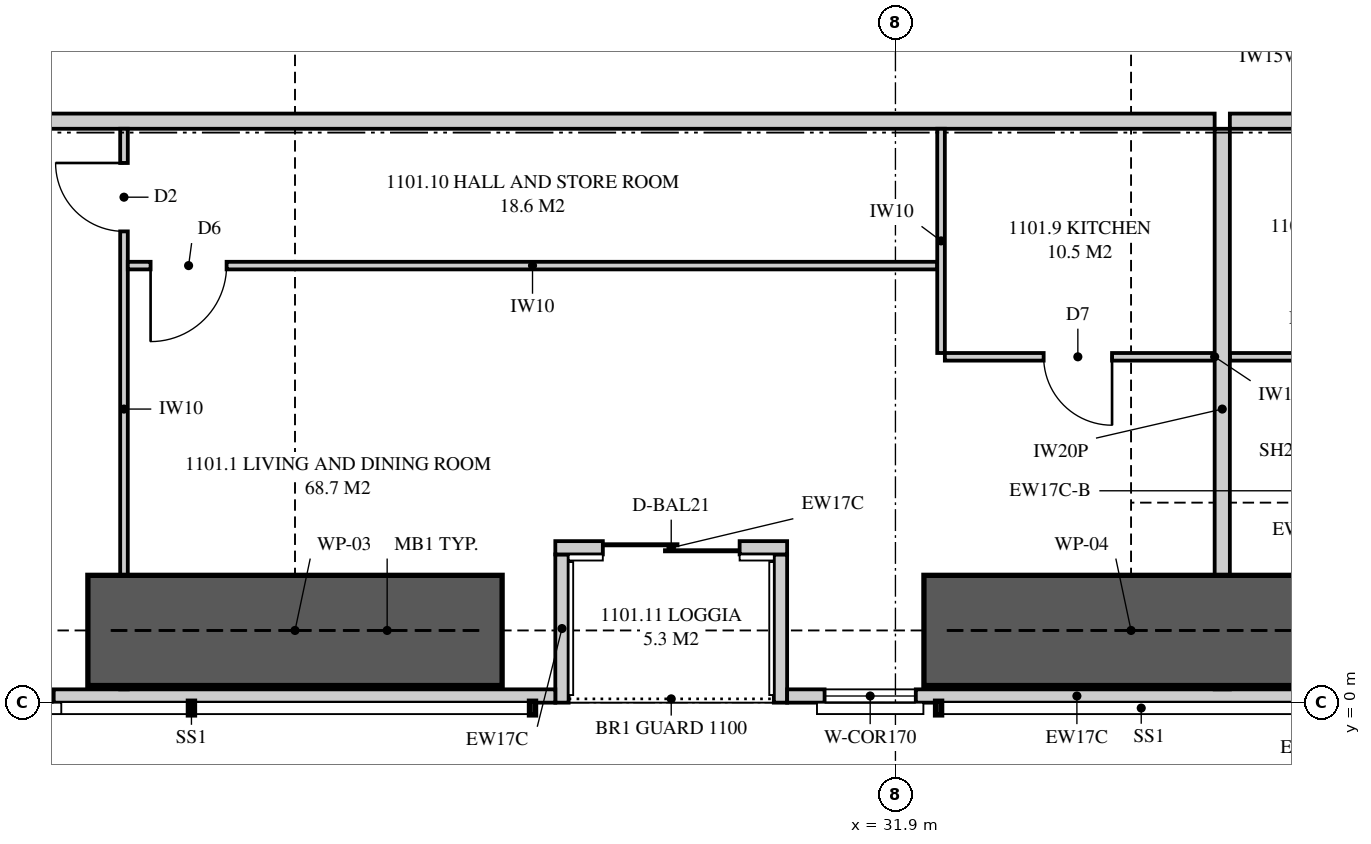
"""IFC4 building model, lengths in metres.
Left out: names, types, materials, properties, quantities, classifications, styles, units other than length and angle.
Written with IfcOpenShell. Run it as: python <this file> out.ifc"""

import sys

from ifc_helpers import new_model, si_unit, direction, frame, frame_2d, origin, place, context, subcontext, project, spatial, polyline, rectangle, outline, extrude, element, fill, save


model = new_model("IFC4")
c1 = context("Model", 3, precision=1e-05, world=origin(), true_north=direction((0.0, 1.0)))
c2 = subcontext(c1, "Body", "Model", "MODEL_VIEW")
j1 = project(units=[si_unit("LENGTHUNIT", "METRE"), si_unit("PLANEANGLEUNIT", "RADIAN")], contexts=[c1])
p1 = place(None, origin())
s1 = spatial("IfcSite", under=j1, at=p1, CompositionType="ELEMENT")
p2 = place(p1, origin())
s2 = spatial("IfcBuilding", under=s1, at=p2, CompositionType="ELEMENT")
p3 = place(p2, frame((0.0, 0.0, 44.45)))
s3 = spatial("IfcBuildingStorey", under=s2, at=p3, CompositionType="ELEMENT", Elevation=44.45)
p4 = place(p3, frame((5.051, 0.087, 0.0), z_axis=(0.0, 0.0, 1.0), x_axis=(1.0, 0.0, 0.0)))
e1 = element("IfcWall", 1, at=p4, inside=s3, PredefinedType="SOLIDWALL", context=c2, shape_type="SweptSolid", body=[
    extrude(outline(polyline([(0.0, 0.0), (22.374, 0.0), (22.374, 2.15), (7.949, 2.15), (7.949, 3.11), (7.793, 3.11), (7.793, 2.15), (7.745, 2.15), (7.745, 3.11), (0.0, 3.11), (0.0, 0.0)])), frame((0.0, 0.087, 0.0), z_axis=(0.0, -1.0, 0.0), x_axis=(1.0, 0.0, 0.0)), (0.0, 0.0, 1.0), 0.175),
])
p5 = place(p4, frame((3.319, 0.0, 0.4)))
e2 = element("IfcOpeningElement", 2, at=p5, cuts=e1, PredefinedType="OPENING", context=c2, shape_type="SweptSolid", body=[
    extrude(rectangle(XDim=1.8, YDim=1.7, at=frame_2d((0.9, 0.85))), frame((0.0, 0.097, 0.0), z_axis=(0.0, -1.0, 0.0), x_axis=(1.0, 0.0, 0.0)), (0.0, 0.0, 1.0), 0.195),
])
p6 = place(p4, frame((10.806, 0.0, 0.4)))
e3 = element("IfcOpeningElement", 3, at=p6, cuts=e1, PredefinedType="OPENING", context=c2, shape_type="SweptSolid", body=[
    extrude(rectangle(XDim=1.8, YDim=1.7, at=frame_2d((0.9, 0.85))), frame((0.0, 0.097, 0.0), z_axis=(0.0, -1.0, 0.0), x_axis=(1.0, 0.0, 0.0)), (0.0, 0.0, 1.0), 0.195),
])
p7 = place(p4, frame((13.974, 0.0, 0.4)))
e4 = element("IfcOpeningElement", 4, at=p7, cuts=e1, PredefinedType="OPENING", context=c2, shape_type="SweptSolid", body=[
    extrude(rectangle(XDim=1.8, YDim=1.7, at=frame_2d((0.9, 0.85))), frame((0.0, 0.097, 0.0), z_axis=(0.0, -1.0, 0.0), x_axis=(1.0, 0.0, 0.0)), (0.0, 0.0, 1.0), 0.195),
])
p8 = place(p3, frame((30.475, 0.087, 0.0), z_axis=(0.0, 0.0, 1.0), x_axis=(1.0, 0.0, 0.0)))
e5 = element("IfcWall", 5, at=p8, inside=s3, PredefinedType="SOLIDWALL", context=c2, shape_type="SweptSolid", body=[
    extrude(outline(polyline([(0.0, 0.0), (7.625, 0.0), (7.625, 3.11), (4.729, 3.11), (4.729, 2.15), (4.681, 2.15), (4.681, 3.11), (4.525, 3.11), (4.525, 2.15), (0.0, 2.15), (0.0, 0.0)])), frame((0.0, 0.087, 0.0), z_axis=(0.0, -1.0, 0.0), x_axis=(1.0, 0.0, 0.0)), (0.0, 0.0, 1.0), 0.175),
])
p9 = place(p8, frame((0.493, 0.0, 0.4)))
e6 = element("IfcOpeningElement", 6, at=p9, cuts=e5, PredefinedType="OPENING", context=c2, shape_type="SweptSolid", body=[
    extrude(rectangle(XDim=1.2, YDim=1.7, at=frame_2d((0.6, 0.85))), frame((0.0, 0.097, 0.0), z_axis=(0.0, -1.0, 0.0), x_axis=(1.0, 0.0, 0.0)), (0.0, 0.0, 1.0), 0.195),
])
p10 = place(p3, frame((27.425, 2.038, 0.0), z_axis=(0.0, 0.0, 1.0), x_axis=(1.0, 0.0, 0.0)))
e7 = element("IfcWall", 7, at=p10, inside=s3, PredefinedType="SOLIDWALL", context=c2, shape_type="SweptSolid", body=[
    extrude(rectangle(XDim=3.05, YDim=0.175, at=frame_2d((1.525, 0.0))), origin(), (0.0, 0.0, 1.0), 3.11),
])
p11 = place(p10, frame((0.625, 0.0, 0.0)))
e8 = element("IfcOpeningElement", 8, at=p11, cuts=e7, PredefinedType="OPENING", context=c2, shape_type="SweptSolid", body=[
    extrude(rectangle(XDim=1.8, YDim=2.1, at=frame_2d((0.9, 1.05))), frame((0.0, 0.097, 0.0), z_axis=(0.0, -1.0, 0.0), x_axis=(1.0, 0.0, 0.0)), (0.0, 0.0, 1.0), 0.195),
])
for number, where, z_axis, x_axis in (
    (9, (27.512, 0.0, 0.0), (0.0, 0.0, 1.0), (0.0, 1.0, 0.0)),
    (10, (30.387, 0.0, 0.0), (0.0, 0.0, 1.0), (0.0, 1.0, 0.0)),
):
    element("IfcWall", number, at=place(p3, frame(where, z_axis=z_axis, x_axis=x_axis)), inside=s3, PredefinedType="SOLIDWALL", context=c2, shape_type="SweptSolid", body=[
        extrude(outline(polyline([(0.0, 0.0), (1.95, 0.0), (1.95, 3.11), (1.75, 3.11), (1.75, 2.15), (0.15, 2.15), (0.15, 3.11), (0.0, 3.11), (0.0, 0.0)])), frame((0.0, 0.087, 0.0), z_axis=(0.0, -1.0, 0.0), x_axis=(1.0, 0.0, 0.0)), (0.0, 0.0, 1.0), 0.175),
    ])
p12 = place(p3, frame((36.2, 0.175, 0.0), z_axis=(0.0, 0.0, 1.0), x_axis=(0.0, 1.0, 0.0)))
e11 = element("IfcWall", 11, at=p12, inside=s3, PredefinedType="PARTITIONING", context=c2, shape_type="SweptSolid", body=[
    extrude(outline(polyline([(0.088, 3.11), (0.0, 3.11), (0.0, 0.0), (0.529, 0.0), (0.529, 0.677), (1.021, 0.677), (1.021, 0.0), (7.375, 0.0), (7.375, 3.11), (3.766, 3.11), (3.766, 2.51), (1.944, 2.51), (1.944, 2.15), (1.021, 2.15), (1.021, 1.473), (0.529, 1.473), (0.529, 2.15), (0.088, 2.15), (0.088, 3.11)])), frame((0.0, 0.1, 0.0), z_axis=(0.0, -1.0, 0.0), x_axis=(1.0, 0.0, 0.0)), (0.0, 0.0, 1.0), 0.2),
])
p13 = place(p3, frame((17.725, 7.65, 0.0), z_axis=(0.0, 0.0, 1.0), x_axis=(1.0, 0.0, 0.0)))
e12 = element("IfcWall", 12, at=p13, inside=s3, PredefinedType="PARTITIONING", context=c2, shape_type="SweptSolid", body=[
    extrude(outline(polyline([(0.0, 0.0), (18.375, 0.0), (18.375, 3.11), (17.612, 3.11), (17.612, 2.541), (16.938, 2.541), (16.938, 3.11), (6.612, 3.11), (6.612, 2.541), (5.938, 2.541), (5.938, 3.11), (0.0, 3.11), (0.0, 0.0)])), frame((0.0, 0.1, 0.0), z_axis=(0.0, -1.0, 0.0), x_axis=(1.0, 0.0, 0.0)), (0.0, 0.0, 1.0), 0.2),
])
p14 = place(p13, frame((0.875, 0.0, 0.0)))
e13 = element("IfcOpeningElement", 13, at=p14, cuts=e12, PredefinedType="OPENING", context=c2, shape_type="SweptSolid", body=[
    extrude(rectangle(XDim=1.05, YDim=2.2, at=frame_2d((0.525, 1.1))), frame((0.0, 0.11, 0.0), z_axis=(0.0, -1.0, 0.0), x_axis=(1.0, 0.0, 0.0)), (0.0, 0.0, 1.0), 0.22),
])
p15 = place(p3, frame((21.75, 0.175, 0.0), z_axis=(0.0, 0.0, 1.0), x_axis=(0.0, 1.0, 0.0)))
e14 = element("IfcWall", 14, at=p15, inside=s3, PredefinedType="PARTITIONING", context=c2, shape_type="SweptSolid", body=[
    extrude(outline(polyline([(0.0, 0.0), (7.375, 0.0), (7.375, 3.11), (1.635, 3.11), (1.635, 2.15), (0.0, 2.15), (0.0, 3.11), (0.0, 0.0)])), frame((0.0, 0.05, 0.0), z_axis=(0.0, -1.0, 0.0), x_axis=(1.0, 0.0, 0.0)), (0.0, 0.0, 1.0), 0.1),
])
p16 = place(p15, frame((6.025, 0.0, 0.0)))
e15 = element("IfcOpeningElement", 15, at=p16, cuts=e14, PredefinedType="OPENING", context=c2, shape_type="SweptSolid", body=[
    extrude(rectangle(XDim=0.9, YDim=2.1, at=frame_2d((0.45, 1.05))), frame((0.0, 0.06, 0.0), z_axis=(0.0, -1.0, 0.0), x_axis=(1.0, 0.0, 0.0)), (0.0, 0.0, 1.0), 0.12),
])
p17 = place(p3, frame((32.55, 4.55, 0.0), z_axis=(0.0, 0.0, 1.0), x_axis=(1.0, 0.0, 0.0)))
e16 = element("IfcWall", 16, at=p17, inside=s3, PredefinedType="PARTITIONING", context=c2, shape_type="SweptSolid", body=[
    extrude(outline(polyline([(0.0, 0.0), (3.55, 0.0), (3.55, 3.11), (2.737, 3.11), (2.737, 2.541), (2.163, 2.541), (2.163, 3.11), (0.0, 3.11), (0.0, 0.0)])), frame((0.0, 0.05, 0.0), z_axis=(0.0, -1.0, 0.0), x_axis=(1.0, 0.0, 0.0)), (0.0, 0.0, 1.0), 0.1),
])
p18 = place(p17, frame((1.3, 0.0, 0.0)))
e17 = element("IfcOpeningElement", 17, at=p18, cuts=e16, PredefinedType="OPENING", context=c2, shape_type="SweptSolid", body=[
    extrude(rectangle(XDim=0.9, YDim=2.1, at=frame_2d((0.45, 1.05))), frame((0.0, 0.06, 0.0), z_axis=(0.0, -1.0, 0.0), x_axis=(1.0, 0.0, 0.0)), (0.0, 0.0, 1.0), 0.12),
])
p19 = place(p3, frame((32.5, 4.6, 0.0), z_axis=(0.0, 0.0, 1.0), x_axis=(0.0, 1.0, 0.0)))
e18 = element("IfcWall", 18, at=p19, inside=s3, PredefinedType="PARTITIONING", context=c2, shape_type="SweptSolid", body=[
    extrude(rectangle(XDim=2.95, YDim=0.1, at=frame_2d((1.475, 0.0))), origin(), (0.0, 0.0, 1.0), 3.11),
])
p20 = place(p3, frame((21.8, 5.75, 0.0), z_axis=(0.0, 0.0, 1.0), x_axis=(1.0, 0.0, 0.0)))
e19 = element("IfcWall", 19, at=p20, inside=s3, PredefinedType="PARTITIONING", context=c2, shape_type="SweptSolid", body=[
    extrude(outline(polyline([(0.0, 0.0), (10.65, 0.0), (10.65, 3.11), (2.487, 3.11), (2.487, 2.541), (1.913, 2.541), (1.913, 3.11), (0.0, 3.11), (0.0, 0.0)])), frame((0.0, 0.05, 0.0), z_axis=(0.0, -1.0, 0.0), x_axis=(1.0, 0.0, 0.0)), (0.0, 0.0, 1.0), 0.1),
])
p21 = place(p20, frame((0.3, 0.0, 0.0)))
e20 = element("IfcOpeningElement", 20, at=p21, cuts=e19, PredefinedType="OPENING", context=c2, shape_type="SweptSolid", body=[
    extrude(rectangle(XDim=1.0, YDim=2.1, at=frame_2d((0.5, 1.05))), frame((0.0, 0.06, 0.0), z_axis=(0.0, -1.0, 0.0), x_axis=(1.0, 0.0, 0.0)), (0.0, 0.0, 1.0), 0.12),
])
p22 = place(p3, frame((36.3, 7.65, 0.0), z_axis=(0.0, 0.0, 1.0), x_axis=(1.0, 0.0, 0.0)))
e21 = element("IfcWall", 21, at=p22, inside=s3, PredefinedType="PARTITIONING", context=c2, shape_type="SweptSolid", body=[
    extrude(outline(polyline([(0.0, 0.0), (9.7, 0.0), (9.7, 3.11), (8.804, 3.11), (8.804, 2.15), (6.96, 2.15), (6.96, 3.11), (0.0, 3.11), (0.0, 0.0)])), frame((0.0, 0.1, 0.0), z_axis=(0.0, -1.0, 0.0), x_axis=(1.0, 0.0, 0.0)), (0.0, 0.0, 1.0), 0.2),
])
p23 = place(p22, frame((1.75, 0.0, 0.0)))
e22 = element("IfcOpeningElement", 22, at=p23, cuts=e21, PredefinedType="OPENING", context=c2, shape_type="SweptSolid", body=[
    extrude(rectangle(XDim=1.05, YDim=2.2, at=frame_2d((0.525, 1.1))), frame((0.0, 0.11, 0.0), z_axis=(0.0, -1.0, 0.0), x_axis=(1.0, 0.0, 0.0)), (0.0, 0.0, 1.0), 0.22),
])
p24 = place(p3, frame((36.3, 4.55, 0.0), z_axis=(0.0, 0.0, 1.0), x_axis=(1.0, 0.0, 0.0)))
e23 = element("IfcWall", 23, at=p24, inside=s3, PredefinedType="PARTITIONING", context=c2, shape_type="SweptSolid", body=[
    extrude(rectangle(XDim=3.55, YDim=0.1, at=frame_2d((1.775, 0.0))), origin(), (0.0, 0.0, 1.0), 3.11),
])
p25 = place(p24, frame((1.35, 0.0, 0.0)))
e24 = element("IfcOpeningElement", 24, at=p25, cuts=e23, PredefinedType="OPENING", context=c2, shape_type="SweptSolid", body=[
    extrude(rectangle(XDim=0.9, YDim=2.1, at=frame_2d((0.45, 1.05))), frame((0.0, 0.06, 0.0), z_axis=(0.0, -1.0, 0.0), x_axis=(1.0, 0.0, 0.0)), (0.0, 0.0, 1.0), 0.12),
])
for number, where, z_axis, x_axis in (
    (25, (21.275, 0.95, 0.0), (0.0, 0.0, 1.0), (1.0, 0.0, 0.0)),
    (26, (32.275, 0.95, 0.0), (0.0, 0.0, 1.0), (1.0, 0.0, 0.0)),
):
    element("IfcWall", number, at=place(p3, frame(where, z_axis=z_axis, x_axis=x_axis)), inside=s3, PredefinedType="SHEAR", context=c2, shape_type="SweptSolid", body=[
        extrude(rectangle(XDim=5.45, YDim=1.45, at=frame_2d((2.725, 0.0))), origin(), (0.0, 0.0, 1.0), 3.35),
    ])
p26 = place(p7, origin())
e27 = element("IfcWindow", 27, at=p26, inside=s3, PartitioningType="SINGLE_PANEL", PredefinedType="WINDOW", context=c2, shape_type="SweptSolid", body=[
    extrude(rectangle(XDim=1.8, YDim=1.7, at=frame_2d((0.9, 0.85))), frame((0.0, 0.03, 0.0), z_axis=(0.0, -1.0, 0.0), x_axis=(1.0, 0.0, 0.0)), (0.0, 0.0, 1.0), 0.06),
])
fill(e4, e27)
p27 = place(p11, origin())
e28 = element("IfcDoor", 28, at=p27, inside=s3, OperationType="SLIDING_TO_LEFT", PredefinedType="DOOR", context=c2, shape_type="SweptSolid", body=[
    extrude(rectangle(XDim=1.8, YDim=2.1, at=frame_2d((0.9, 1.05))), frame((0.0, 0.025, 0.0), z_axis=(0.0, -1.0, 0.0), x_axis=(1.0, 0.0, 0.0)), (0.0, 0.0, 1.0), 0.05),
])
fill(e8, e28)
p28 = place(p9, origin())
e29 = element("IfcWindow", 29, at=p28, inside=s3, PartitioningType="SINGLE_PANEL", PredefinedType="WINDOW", context=c2, shape_type="SweptSolid", body=[
    extrude(rectangle(XDim=1.2, YDim=1.7, at=frame_2d((0.6, 0.85))), frame((0.0, 0.03, 0.0), z_axis=(0.0, -1.0, 0.0), x_axis=(1.0, 0.0, 0.0)), (0.0, 0.0, 1.0), 0.06),
])
fill(e6, e29)
p29 = place(p16, origin())
e30 = element("IfcDoor", 30, at=p29, inside=s3, OperationType="SINGLE_SWING_RIGHT", PredefinedType="DOOR", context=c2, shape_type="SweptSolid", body=[
    extrude(rectangle(XDim=0.9, YDim=2.1, at=frame_2d((0.45, 1.05))), frame((0.0, 0.025, 0.0), z_axis=(0.0, -1.0, 0.0), x_axis=(1.0, 0.0, 0.0)), (0.0, 0.0, 1.0), 0.05),
])
fill(e15, e30)
p30 = place(p18, frame((0.9, 0.0, 0.0), z_axis=(0.0, 0.0, 1.0), x_axis=(-1.0, 0.0, 0.0)))
e31 = element("IfcDoor", 31, at=p30, inside=s3, OperationType="SINGLE_SWING_LEFT", PredefinedType="DOOR", context=c2, shape_type="SweptSolid", body=[
    extrude(rectangle(XDim=0.9, YDim=2.1, at=frame_2d((0.45, 1.05))), frame((0.0, 0.025, 0.0), z_axis=(0.0, -1.0, 0.0), x_axis=(1.0, 0.0, 0.0)), (0.0, 0.0, 1.0), 0.05),
])
fill(e17, e31)
p31 = place(p21, frame((1.0, 0.0, 0.0), z_axis=(0.0, 0.0, 1.0), x_axis=(-1.0, 0.0, 0.0)))
e32 = element("IfcDoor", 32, at=p31, inside=s3, OperationType="SINGLE_SWING_RIGHT", PredefinedType="DOOR", context=c2, shape_type="SweptSolid", body=[
    extrude(rectangle(XDim=1.0, YDim=2.1, at=frame_2d((0.5, 1.05))), frame((0.0, 0.025, 0.0), z_axis=(0.0, -1.0, 0.0), x_axis=(1.0, 0.0, 0.0)), (0.0, 0.0, 1.0), 0.05),
])
fill(e20, e32)
save(model, sys.argv[1])
